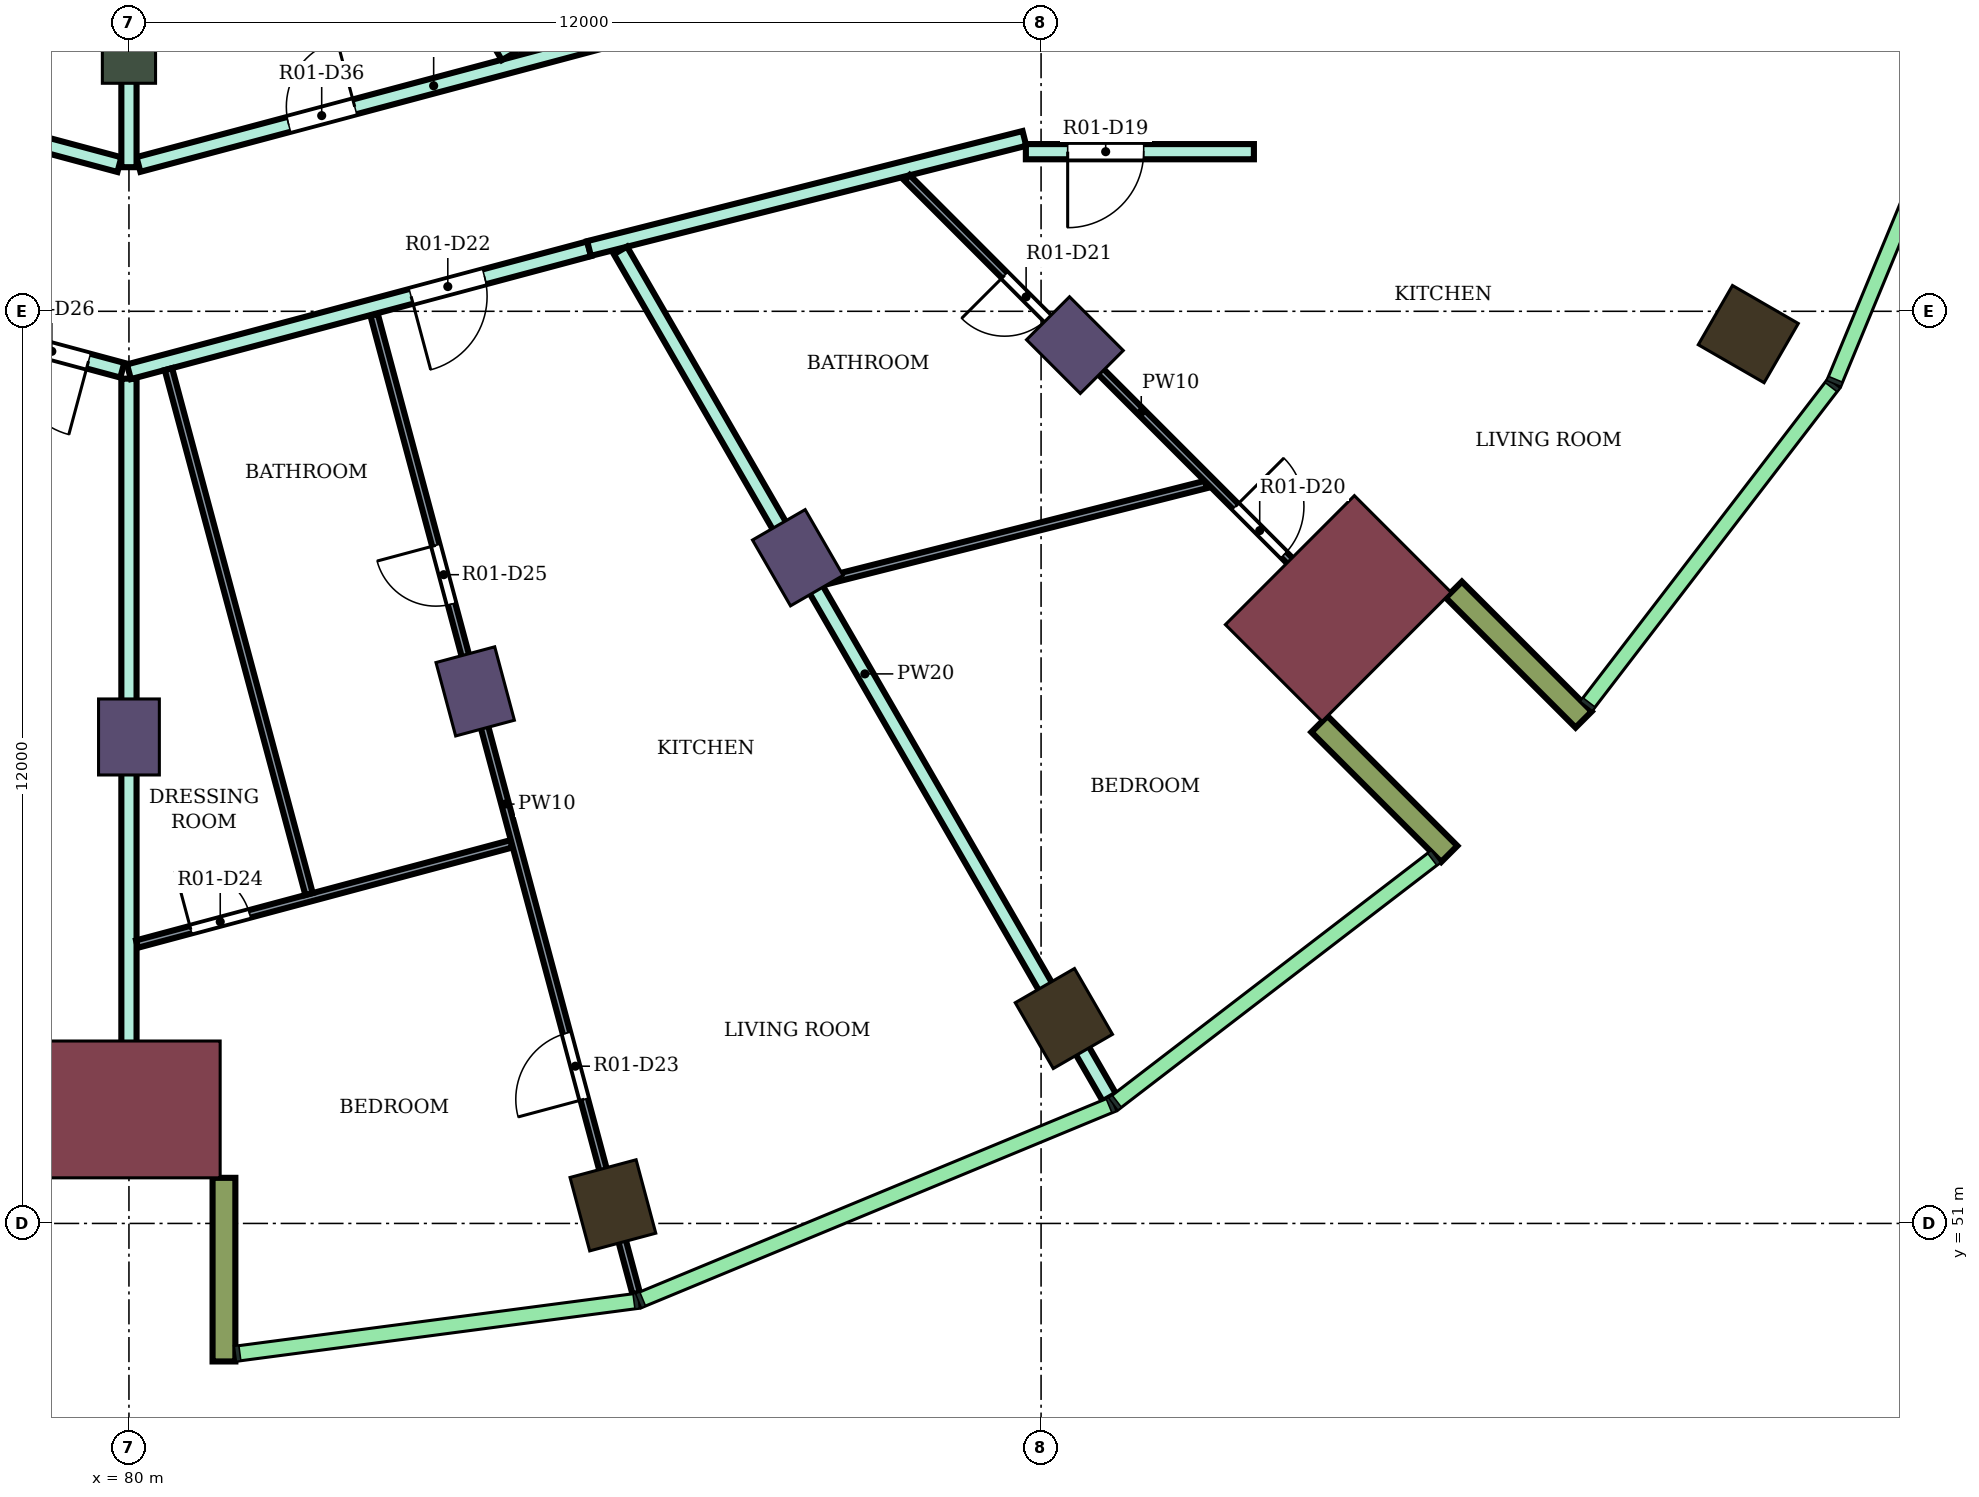
"""IFC4 building model, lengths in metres.
Left out: names, types, materials, properties, quantities, classifications, styles, units other than length and angle.
Written with IfcOpenShell. Run it as: python <this file> out.ifc"""

import sys

from ifc_helpers import new_model, si_unit, direction, frame, frame_2d, origin, origin_2d, place, context, subcontext, project, spatial, rectangle, extrude, element, fill, save


model = new_model("IFC4")
c1 = context("Model", 3, precision=1e-05, world=origin(), true_north=direction((0.0, 1.0)))
c2 = subcontext(c1, "Body", "Model", "MODEL_VIEW")
j1 = project(units=[si_unit("LENGTHUNIT", "METRE"), si_unit("PLANEANGLEUNIT", "RADIAN")], contexts=[c1])
p1 = place(None, origin())
s1 = spatial("IfcSite", under=j1, at=p1, CompositionType="ELEMENT")
p2 = place(p1, origin())
s2 = spatial("IfcBuilding", under=s1, at=p2, CompositionType="ELEMENT")
p3 = place(p2, frame((0.0, 0.0, 157.7)))
s3 = spatial("IfcBuildingStorey", under=s2, at=p3, CompositionType="ELEMENT", Elevation=157.7)
for number, where, z_axis, x_axis in (
    (1, (86.367, 51.238, 0.0), (0.0, 0.0, 1.0), (0.259, -0.966, 0.0)),
    (2, (92.3, 53.696, 0.0), (0.0, 0.0, 1.0), (0.5, -0.866, 0.0)),
    (3, (101.304, 62.7, 0.0), (0.0, 0.0, 1.0), (0.866, -0.5, 0.0)),
):
    element("IfcColumn", number, at=place(p3, frame(where, z_axis=z_axis, x_axis=x_axis)), inside=s3, PredefinedType="COLUMN", context=c2, shape_type="SweptSolid", body=[
        extrude(rectangle(XDim=1.0, YDim=0.9, at=origin_2d()), origin(), (0.0, 0.0, 1.0), 4.1),
    ])
for number, where, z_axis, x_axis in (
    (4, (80.0, 57.4, 0.0), (0.0, 0.0, 1.0), (0.0, -1.0, 0.0)),
    (5, (84.555, 58.0, 0.0), (0.0, 0.0, 1.0), (0.259, -0.966, 0.0)),
    (6, (88.8, 59.758, 0.0), (0.0, 0.0, 1.0), (0.5, -0.866, 0.0)),
    (7, (92.445, 62.555, 0.0), (0.0, 0.0, 1.0), (0.707, -0.707, 0.0)),
):
    element("IfcColumn", number, at=place(p3, frame(where, z_axis=z_axis, x_axis=x_axis)), inside=s3, PredefinedType="COLUMN", context=c2, shape_type="SweptSolid", body=[
        extrude(rectangle(XDim=1.0, YDim=0.8, at=origin_2d()), origin(), (0.0, 0.0, 1.0), 4.1),
    ])
p4 = place(p3, frame((80.0, 66.4, 0.0), z_axis=(0.0, 0.0, 1.0), x_axis=(0.0, -1.0, 0.0)))
e8 = element("IfcColumn", 8, at=p4, inside=s3, PredefinedType="COLUMN", context=c2, shape_type="SweptSolid", body=[
    extrude(rectangle(XDim=0.8, YDim=0.7, at=origin_2d()), origin(), (0.0, 0.0, 1.0), 4.1),
])
for number, where, z_axis, x_axis in (
    (9, (80.0, 52.5, 0.0), (0.0, 0.0, 1.0), (0.0, -1.0, 0.0)),
    (10, (95.91, 59.09, 0.0), (0.0, 0.0, 1.0), (0.707, -0.707, 0.0)),
):
    element("IfcColumn", number, at=place(p3, frame(where, z_axis=z_axis, x_axis=x_axis)), inside=s3, PredefinedType="COLUMN", context=c2, shape_type="SweptSolid", body=[
        extrude(rectangle(XDim=1.8, YDim=2.4, at=origin_2d()), origin(), (0.0, 0.0, 1.0), 4.1),
    ])
for number, where, z_axis, x_axis in (
    (11, (81.25, 51.6, 0.0), (0.0, 0.0, 1.0), (0.0, -1.0, 0.0)),
    (12, (95.662, 57.57, 0.0), (0.0, 0.0, 1.0), (0.707, -0.707, 0.0)),
    (13, (97.43, 59.338, 0.0), (0.0, 0.0, 1.0), (0.707, -0.707, 0.0)),
):
    element("IfcWall", number, at=place(p3, frame(where, z_axis=z_axis, x_axis=x_axis)), inside=s3, PredefinedType="NOTDEFINED", context=c2, shape_type="SweptSolid", body=[
        extrude(rectangle(XDim=2.416, YDim=0.3, at=frame_2d((1.208, 0.0))), origin(), (0.0, 0.0, 1.0), 4.1),
    ])
p5 = place(p3, frame((74.15, 63.772, 0.0), z_axis=(0.0, 0.0, 1.0), x_axis=(0.965807109237, -0.259261697417, 0.0)))
e14 = element("IfcWall", 14, at=p5, inside=s3, PredefinedType="PARTITIONING", context=c2, shape_type="SweptSolid", body=[
    extrude(rectangle(XDim=5.967, YDim=0.2, at=frame_2d((2.983, 0.0))), origin(), (0.0, 0.0, 1.0), 3.65),
])
p6 = place(p5, frame((4.507, 0.0, 0.0)))
e15 = element("IfcOpeningElement", 15, at=p6, cuts=e14, PredefinedType="OPENING", context=c2, shape_type="SweptSolid", body=[
    extrude(rectangle(XDim=1.0, YDim=2.1, at=frame_2d((0.5, 1.05))), frame((0.0, 0.11, 0.0), z_axis=(0.0, -1.0, 0.0), x_axis=(1.0, 0.0, 0.0)), (0.0, 0.0, 1.0), 0.22),
])
p7 = place(p3, frame((74.603, 66.342, 0.0), z_axis=(0.0, 0.0, 1.0), x_axis=(0.965920893652, -0.258837453254, 0.0)))
e16 = element("IfcWall", 16, at=p7, inside=s3, PredefinedType="PARTITIONING", context=c2, shape_type="SweptSolid", body=[
    extrude(rectangle(XDim=5.458, YDim=0.2, at=frame_2d((2.729, 0.0))), origin(), (0.0, 0.0, 1.0), 3.65),
])
p8 = place(p7, frame((2.512, 0.0, 0.0)))
e17 = element("IfcOpeningElement", 17, at=p8, cuts=e16, PredefinedType="OPENING", context=c2, shape_type="SweptSolid", body=[
    extrude(rectangle(XDim=0.9, YDim=2.1, at=frame_2d((0.45, 1.05))), frame((0.0, 0.11, 0.0), z_axis=(0.0, -1.0, 0.0), x_axis=(1.0, 0.0, 0.0)), (0.0, 0.0, 1.0), 0.22),
])
p9 = place(p3, frame((80.125, 64.932, 0.0), z_axis=(0.0, 0.0, 1.0), x_axis=(0.966236955806, 0.257655089674, 0.0)))
e18 = element("IfcWall", 18, at=p9, inside=s3, PredefinedType="PARTITIONING", context=c2, shape_type="SweptSolid", body=[
    extrude(rectangle(XDim=8.039, YDim=0.2, at=frame_2d((4.02, 0.0))), origin(), (0.0, 0.0, 1.0), 3.65),
])
p10 = place(p9, frame((6.298, 0.0, 0.0)))
e19 = element("IfcOpeningElement", 19, at=p10, cuts=e18, PredefinedType="OPENING", context=c2, shape_type="SweptSolid", body=[
    extrude(rectangle(XDim=0.9, YDim=2.1, at=frame_2d((0.45, 1.05))), frame((0.0, 0.11, 0.0), z_axis=(0.0, -1.0, 0.0), x_axis=(1.0, 0.0, 0.0)), (0.0, 0.0, 1.0), 0.22),
])
p11 = place(p9, frame((2.045, 0.0, 0.0)))
e20 = element("IfcOpeningElement", 20, at=p11, cuts=e18, PredefinedType="OPENING", context=c2, shape_type="SweptSolid", body=[
    extrude(rectangle(XDim=0.9, YDim=2.1, at=frame_2d((0.45, 1.05))), frame((0.0, 0.11, 0.0), z_axis=(0.0, -1.0, 0.0), x_axis=(1.0, 0.0, 0.0)), (0.0, 0.0, 1.0), 0.22),
])
p12 = place(p3, frame((80.0, 51.8, 0.0), z_axis=(0.0, 0.0, 1.0), x_axis=(0.0, 1.0, 0.0)))
e21 = element("IfcWall", 21, at=p12, inside=s3, PredefinedType="PARTITIONING", context=c2, shape_type="SweptSolid", body=[
    extrude(rectangle(XDim=10.314, YDim=0.2, at=frame_2d((5.157, 0.0))), origin(), (0.0, 0.0, 1.0), 3.65),
])
p13 = place(p3, frame((80.0, 62.205, 0.0), z_axis=(0.0, 0.0, 1.0), x_axis=(0.966104192593, 0.258152453124, 0.0)))
e22 = element("IfcWall", 22, at=p13, inside=s3, PredefinedType="PARTITIONING", context=c2, shape_type="SweptSolid", body=[
    extrude(rectangle(XDim=6.266, YDim=0.2, at=frame_2d((3.133, 0.0))), origin(), (0.0, 0.0, 1.0), 3.65),
])
p14 = place(p13, frame((3.842, 0.0, 0.0)))
e23 = element("IfcOpeningElement", 23, at=p14, cuts=e22, PredefinedType="OPENING", context=c2, shape_type="SweptSolid", body=[
    extrude(rectangle(XDim=1.0, YDim=2.1, at=frame_2d((0.5, 1.05))), frame((0.0, 0.11, 0.0), z_axis=(0.0, -1.0, 0.0), x_axis=(1.0, 0.0, 0.0)), (0.0, 0.0, 1.0), 0.22),
])
p15 = place(p3, frame((80.0, 64.896, 0.0), z_axis=(0.0, 0.0, 1.0), x_axis=(0.0, 1.0, 0.0)))
e24 = element("IfcWall", 24, at=p15, inside=s3, PredefinedType="PARTITIONING", context=c2, shape_type="SweptSolid", body=[
    extrude(rectangle(XDim=2.405, YDim=0.2, at=frame_2d((1.203, 0.0))), origin(), (0.0, 0.0, 1.0), 3.65),
])
p16 = place(p3, frame((83.85, 68.333, 0.0), z_axis=(0.0, 0.0, 1.0), x_axis=(0.499953638813, -0.866052168773, 0.0)))
e25 = element("IfcWall", 25, at=p16, inside=s3, PredefinedType="PARTITIONING", context=c2, shape_type="SweptSolid", body=[
    extrude(rectangle(XDim=2.285, YDim=0.2, at=frame_2d((1.143, 0.0))), origin(), (0.0, 0.0, 1.0), 3.65),
])
p17 = place(p3, frame((86.053, 63.826, 0.0), z_axis=(0.0, 0.0, 1.0), x_axis=(0.969490004987, 0.245130843083, 0.0)))
e26 = element("IfcWall", 26, at=p17, inside=s3, PredefinedType="PARTITIONING", context=c2, shape_type="SweptSolid", body=[
    extrude(rectangle(XDim=5.908, YDim=0.2, at=frame_2d((2.954, 0.0))), origin(), (0.0, 0.0, 1.0), 3.65),
])
p18 = place(p3, frame((86.466, 63.801, 0.0), z_axis=(0.0, 0.0, 1.0), x_axis=(0.499951314491, -0.866053510551, 0.0)))
e27 = element("IfcWall", 27, at=p18, inside=s3, PredefinedType="PARTITIONING", context=c2, shape_type="SweptSolid", body=[
    extrude(rectangle(XDim=12.866, YDim=0.2, at=frame_2d((6.433, 0.0))), origin(), (0.0, 0.0, 1.0), 3.65),
])
p19 = place(p3, frame((91.8, 65.1, 0.0), z_axis=(0.0, 0.0, 1.0), x_axis=(1.0, 0.0, 0.0)))
e28 = element("IfcWall", 28, at=p19, inside=s3, PredefinedType="PARTITIONING", context=c2, shape_type="SweptSolid", body=[
    extrude(rectangle(XDim=3.0, YDim=0.2, at=frame_2d((1.5, 0.0))), origin(), (0.0, 0.0, 1.0), 3.65),
])
p20 = place(p19, frame((0.55, 0.0, 0.0)))
e29 = element("IfcOpeningElement", 29, at=p20, cuts=e28, PredefinedType="OPENING", context=c2, shape_type="SweptSolid", body=[
    extrude(rectangle(XDim=1.0, YDim=2.1, at=frame_2d((0.5, 1.05))), frame((0.0, 0.11, 0.0), z_axis=(0.0, -1.0, 0.0), x_axis=(1.0, 0.0, 0.0)), (0.0, 0.0, 1.0), 0.22),
])
p21 = place(p3, frame((80.106, 54.676, 0.0), z_axis=(0.0, 0.0, 1.0), x_axis=(0.965976901679, 0.258628353863, 0.0)))
e30 = element("IfcWall", 30, at=p21, inside=s3, PredefinedType="PARTITIONING", context=c2, shape_type="SweptSolid", body=[
    extrude(rectangle(XDim=5.097, YDim=0.1, at=frame_2d((2.549, 0.0))), origin(), (0.0, 0.0, 1.0), 3.65),
])
p22 = place(p21, frame((0.733, 0.0, 0.0)))
e31 = element("IfcOpeningElement", 31, at=p22, cuts=e30, PredefinedType="OPENING", context=c2, shape_type="SweptSolid", body=[
    extrude(rectangle(XDim=0.8, YDim=2.1, at=frame_2d((0.4, 1.05))), frame((0.0, 0.06, 0.0), z_axis=(0.0, -1.0, 0.0), x_axis=(1.0, 0.0, 0.0)), (0.0, 0.0, 1.0), 0.12),
])
p23 = place(p3, frame((80.519, 62.239, 0.0), z_axis=(0.0, 0.0, 1.0), x_axis=(0.25878046533, -0.965936162882, 0.0)))
e32 = element("IfcWall", 32, at=p23, inside=s3, PredefinedType="PARTITIONING", context=c2, shape_type="SweptSolid", body=[
    extrude(rectangle(XDim=7.149, YDim=0.1, at=frame_2d((3.575, 0.0))), origin(), (0.0, 0.0, 1.0), 3.65),
])
p24 = place(p3, frame((83.225, 62.954, 0.0), z_axis=(0.0, 0.0, 1.0), x_axis=(0.258715941946, -0.965953446799, 0.0)))
e33 = element("IfcWall", 33, at=p24, inside=s3, PredefinedType="PARTITIONING", context=c2, shape_type="SweptSolid", body=[
    extrude(rectangle(XDim=13.328, YDim=0.1, at=frame_2d((6.664, 0.0))), origin(), (0.0, 0.0, 1.0), 3.65),
])
p25 = place(p24, frame((9.784, 0.0, 0.0)))
e34 = element("IfcOpeningElement", 34, at=p25, cuts=e33, PredefinedType="OPENING", context=c2, shape_type="SweptSolid", body=[
    extrude(rectangle(XDim=0.9, YDim=2.1, at=frame_2d((0.45, 1.05))), frame((0.0, 0.06, 0.0), z_axis=(0.0, -1.0, 0.0), x_axis=(1.0, 0.0, 0.0)), (0.0, 0.0, 1.0), 0.12),
])
p26 = place(p24, frame((3.14, 0.0, 0.0)))
e35 = element("IfcOpeningElement", 35, at=p26, cuts=e33, PredefinedType="OPENING", context=c2, shape_type="SweptSolid", body=[
    extrude(rectangle(XDim=0.8, YDim=2.1, at=frame_2d((0.4, 1.05))), frame((0.0, 0.06, 0.0), z_axis=(0.0, -1.0, 0.0), x_axis=(1.0, 0.0, 0.0)), (0.0, 0.0, 1.0), 0.12),
])
p27 = place(p3, frame((89.106, 59.441, 0.0), z_axis=(0.0, 0.0, 1.0), x_axis=(0.969462385749, 0.245240051009, 0.0)))
e36 = element("IfcWall", 36, at=p27, inside=s3, PredefinedType="PARTITIONING", context=c2, shape_type="SweptSolid", body=[
    extrude(rectangle(XDim=5.223, YDim=0.1, at=frame_2d((2.612, 0.0))), origin(), (0.0, 0.0, 1.0), 3.65),
])
p28 = place(p3, frame((90.236, 64.758, 0.0), z_axis=(0.0, 0.0, 1.0), x_axis=(0.706938769128, -0.707274753334, 0.0)))
e37 = element("IfcWall", 37, at=p28, inside=s3, PredefinedType="PARTITIONING", context=c2, shape_type="SweptSolid", body=[
    extrude(rectangle(XDim=8.72, YDim=0.1, at=frame_2d((4.36, 0.0))), origin(), (0.0, 0.0, 1.0), 3.65),
])
p29 = place(p28, frame((6.115, 0.0, 0.0)))
e38 = element("IfcOpeningElement", 38, at=p29, cuts=e37, PredefinedType="OPENING", context=c2, shape_type="SweptSolid", body=[
    extrude(rectangle(XDim=0.9, YDim=2.1, at=frame_2d((0.45, 1.05))), frame((0.0, 0.06, 0.0), z_axis=(0.0, -1.0, 0.0), x_axis=(1.0, 0.0, 0.0)), (0.0, 0.0, 1.0), 0.12),
])
p30 = place(p28, frame((1.817, 0.0, 0.0)))
e39 = element("IfcOpeningElement", 39, at=p30, cuts=e37, PredefinedType="OPENING", context=c2, shape_type="SweptSolid", body=[
    extrude(rectangle(XDim=0.8, YDim=2.1, at=frame_2d((0.4, 1.05))), frame((0.0, 0.06, 0.0), z_axis=(0.0, -1.0, 0.0), x_axis=(1.0, 0.0, 0.0)), (0.0, 0.0, 1.0), 0.12),
])
p31 = place(p20, frame((1.0, 0.0, 0.0), z_axis=(0.0, 0.0, 1.0), x_axis=(-1.0, 0.0, 0.0)))
e40 = element("IfcDoor", 40, at=p31, inside=s3, OperationType="SINGLE_SWING_RIGHT", PredefinedType="DOOR", context=c2, shape_type="SweptSolid", body=[
    extrude(rectangle(XDim=1.0, YDim=2.1, at=frame_2d((0.5, 1.05))), frame((0.0, 0.025, 0.0), z_axis=(0.0, -1.0, 0.0), x_axis=(1.0, 0.0, 0.0)), (0.0, 0.0, 1.0), 0.05),
])
fill(e29, e40)
p32 = place(p29, origin())
e41 = element("IfcDoor", 41, at=p32, inside=s3, OperationType="SINGLE_SWING_LEFT", PredefinedType="DOOR", context=c2, shape_type="SweptSolid", body=[
    extrude(rectangle(XDim=0.9, YDim=2.1, at=frame_2d((0.45, 1.05))), frame((0.0, 0.025, 0.0), z_axis=(0.0, -1.0, 0.0), x_axis=(1.0, 0.0, 0.0)), (0.0, 0.0, 1.0), 0.05),
])
fill(e38, e41)
p33 = place(p30, frame((0.8, 0.0, 0.0), z_axis=(0.0, 0.0, 1.0), x_axis=(-1.0, 0.0, 0.0)))
e42 = element("IfcDoor", 42, at=p33, inside=s3, OperationType="SINGLE_SWING_RIGHT", PredefinedType="DOOR", context=c2, shape_type="SweptSolid", body=[
    extrude(rectangle(XDim=0.8, YDim=2.1, at=frame_2d((0.4, 1.05))), frame((0.0, 0.025, 0.0), z_axis=(0.0, -1.0, 0.0), x_axis=(1.0, 0.0, 0.0)), (0.0, 0.0, 1.0), 0.05),
])
fill(e39, e42)
p34 = place(p14, frame((1.0, 0.0, 0.0), z_axis=(0.0, 0.0, 1.0), x_axis=(-1.0, 0.0, 0.0)))
e43 = element("IfcDoor", 43, at=p34, inside=s3, OperationType="SINGLE_SWING_RIGHT", PredefinedType="DOOR", context=c2, shape_type="SweptSolid", body=[
    extrude(rectangle(XDim=1.0, YDim=2.1, at=frame_2d((0.5, 1.05))), frame((0.0, 0.025, 0.0), z_axis=(0.0, -1.0, 0.0), x_axis=(1.0, 0.0, 0.0)), (0.0, 0.0, 1.0), 0.05),
])
fill(e23, e43)
p35 = place(p25, frame((0.9, 0.0, 0.0), z_axis=(0.0, 0.0, 1.0), x_axis=(-1.0, 0.0, 0.0)))
e44 = element("IfcDoor", 44, at=p35, inside=s3, OperationType="SINGLE_SWING_LEFT", PredefinedType="DOOR", context=c2, shape_type="SweptSolid", body=[
    extrude(rectangle(XDim=0.9, YDim=2.1, at=frame_2d((0.45, 1.05))), frame((0.0, 0.025, 0.0), z_axis=(0.0, -1.0, 0.0), x_axis=(1.0, 0.0, 0.0)), (0.0, 0.0, 1.0), 0.05),
])
fill(e34, e44)
p36 = place(p22, origin())
e45 = element("IfcDoor", 45, at=p36, inside=s3, OperationType="SINGLE_SWING_LEFT", PredefinedType="DOOR", context=c2, shape_type="SweptSolid", body=[
    extrude(rectangle(XDim=0.8, YDim=2.1, at=frame_2d((0.4, 1.05))), frame((0.0, 0.025, 0.0), z_axis=(0.0, -1.0, 0.0), x_axis=(1.0, 0.0, 0.0)), (0.0, 0.0, 1.0), 0.05),
])
fill(e31, e45)
p37 = place(p26, frame((0.8, 0.0, 0.0), z_axis=(0.0, 0.0, 1.0), x_axis=(-1.0, 0.0, 0.0)))
e46 = element("IfcDoor", 46, at=p37, inside=s3, OperationType="SINGLE_SWING_RIGHT", PredefinedType="DOOR", context=c2, shape_type="SweptSolid", body=[
    extrude(rectangle(XDim=0.8, YDim=2.1, at=frame_2d((0.4, 1.05))), frame((0.0, 0.025, 0.0), z_axis=(0.0, -1.0, 0.0), x_axis=(1.0, 0.0, 0.0)), (0.0, 0.0, 1.0), 0.05),
])
fill(e35, e46)
p38 = place(p6, frame((1.0, 0.0, 0.0), z_axis=(0.0, 0.0, 1.0), x_axis=(-1.0, 0.0, 0.0)))
e47 = element("IfcDoor", 47, at=p38, inside=s3, OperationType="SINGLE_SWING_LEFT", PredefinedType="DOOR", context=c2, shape_type="SweptSolid", body=[
    extrude(rectangle(XDim=1.0, YDim=2.1, at=frame_2d((0.5, 1.05))), frame((0.0, 0.025, 0.0), z_axis=(0.0, -1.0, 0.0), x_axis=(1.0, 0.0, 0.0)), (0.0, 0.0, 1.0), 0.05),
])
fill(e15, e47)
p39 = place(p11, origin())
e48 = element("IfcDoor", 48, at=p39, inside=s3, OperationType="SINGLE_SWING_RIGHT", PredefinedType="DOOR", context=c2, shape_type="SweptSolid", body=[
    extrude(rectangle(XDim=0.9, YDim=2.1, at=frame_2d((0.45, 1.05))), frame((0.0, 0.025, 0.0), z_axis=(0.0, -1.0, 0.0), x_axis=(1.0, 0.0, 0.0)), (0.0, 0.0, 1.0), 0.05),
])
fill(e20, e48)
save(model, sys.argv[1])
